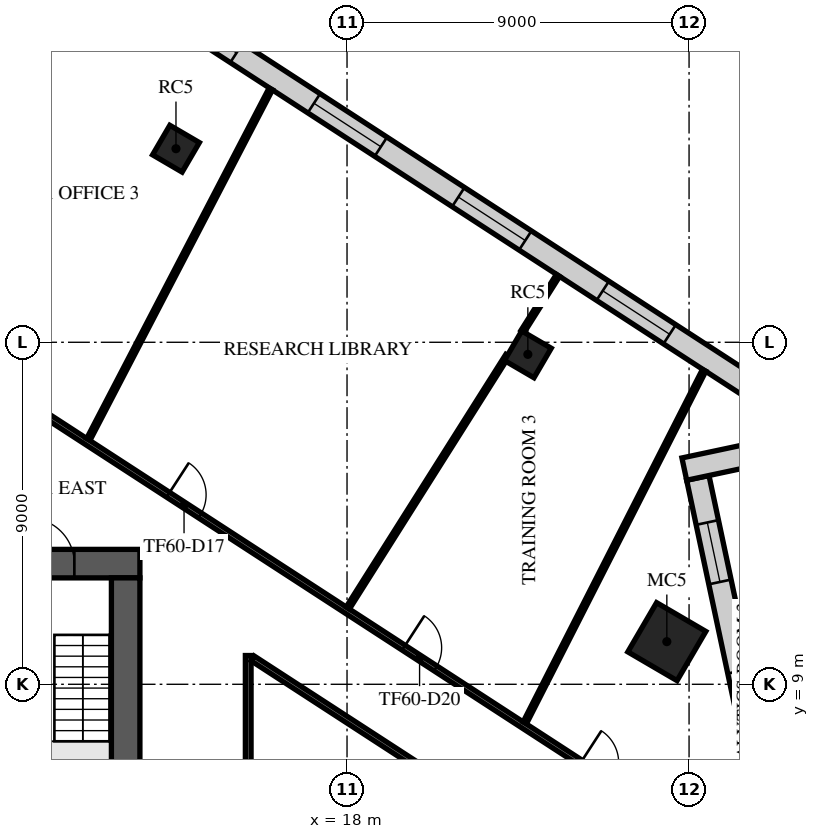
"""IFC4 building model, lengths in metres.
Left out: names, types, materials, properties, quantities, classifications, styles, units other than length and angle.
Written with IfcOpenShell. Run it as: python <this file> out.ifc"""

import sys

from ifc_helpers import new_model, si_unit, direction, frame, frame_2d, origin, origin_2d, place, context, subcontext, project, spatial, rectangle, extrude, element, fill, save


model = new_model("IFC4")
c1 = context("Model", 3, precision=1e-05, world=origin(), true_north=direction((0.0, 1.0)))
c2 = subcontext(c1, "Body", "Model", "MODEL_VIEW")
j1 = project(units=[si_unit("LENGTHUNIT", "METRE"), si_unit("PLANEANGLEUNIT", "RADIAN")], contexts=[c1])
p1 = place(None, origin())
s1 = spatial("IfcSite", under=j1, at=p1, CompositionType="ELEMENT")
p2 = place(p1, origin())
s2 = spatial("IfcBuilding", under=s1, at=p2, CompositionType="ELEMENT")
p3 = place(p2, frame((0.0, 0.0, 254.9)))
s3 = spatial("IfcBuildingStorey", under=s2, at=p3, CompositionType="ELEMENT", Elevation=254.9)
p4 = place(p3, frame((26.415, 10.122, 0.0), z_axis=(0.0, 0.0, 1.0), x_axis=(0.504643651291, 0.863327739165, 0.0)))
e1 = element("IfcColumn", 1, at=p4, inside=s3, PredefinedType="COLUMN", context=c2, shape_type="SweptSolid", body=[
    extrude(rectangle(XDim=1.5, YDim=1.5, at=origin_2d()), origin(), (0.0, 0.0, 1.0), 4.0),
])
for number, where, z_axis, x_axis in (
    (2, (22.758, 17.682, 0.0), (0.0, 0.0, 1.0), (0.505, 0.863, 0.0)),
    (3, (13.499, 23.094, 0.0), (0.0, 0.0, 1.0), (0.505, 0.863, 0.0)),
):
    element("IfcColumn", number, at=place(p3, frame(where, z_axis=z_axis, x_axis=x_axis)), inside=s3, PredefinedType="COLUMN", context=c2, shape_type="SweptSolid", body=[
        extrude(rectangle(XDim=0.9, YDim=0.9, at=origin_2d()), origin(), (0.0, 0.0, 1.0), 4.0),
    ])
p5 = place(p3, frame((-12.55, 12.175, 0.0), z_axis=(0.0, 0.0, 1.0), x_axis=(1.0, 0.0, 0.0)))
e4 = element("IfcWall", 4, at=p5, inside=s3, PredefinedType="SHEAR", context=c2, shape_type="SweptSolid", body=[
    extrude(rectangle(XDim=25.1, YDim=0.75, at=frame_2d((12.55, 0.0))), origin(), (0.0, 0.0, 1.0), 3.64),
])
p6 = place(p5, frame((11.35, 0.0, 0.0)))
e5 = element("IfcOpeningElement", 5, at=p6, cuts=e4, PredefinedType="OPENING", context=c2, shape_type="SweptSolid", body=[
    extrude(rectangle(XDim=2.4, YDim=2.4, at=frame_2d((1.2, 1.2))), frame((0.0, 0.385, 0.0), z_axis=(0.0, -1.0, 0.0), x_axis=(1.0, 0.0, 0.0)), (0.0, 0.0, 1.0), 0.77),
])
p7 = place(p5, frame((22.175, 0.0, 0.0)))
e6 = element("IfcOpeningElement", 6, at=p7, cuts=e4, PredefinedType="OPENING", context=c2, shape_type="SweptSolid", body=[
    extrude(rectangle(XDim=1.2, YDim=2.1, at=frame_2d((0.6, 1.05))), frame((0.0, 0.385, 0.0), z_axis=(0.0, -1.0, 0.0), x_axis=(1.0, 0.0, 0.0)), (0.0, 0.0, 1.0), 0.77),
])
p8 = place(p5, frame((1.15, 0.0, 0.0)))
e7 = element("IfcOpeningElement", 7, at=p8, cuts=e4, PredefinedType="OPENING", context=c2, shape_type="SweptSolid", body=[
    extrude(rectangle(XDim=1.0, YDim=2.1, at=frame_2d((0.5, 1.05))), frame((0.0, 0.385, 0.0), z_axis=(0.0, -1.0, 0.0), x_axis=(1.0, 0.0, 0.0)), (0.0, 0.0, 1.0), 0.77),
])
p9 = place(p3, frame((12.175, -11.8, 0.0), z_axis=(0.0, 0.0, 1.0), x_axis=(0.0, 1.0, 0.0)))
e8 = element("IfcWall", 8, at=p9, inside=s3, PredefinedType="SHEAR", context=c2, shape_type="SweptSolid", body=[
    extrude(rectangle(XDim=23.6, YDim=0.75, at=frame_2d((11.8, 0.0))), origin(), (0.0, 0.0, 1.0), 3.64),
])
p10 = place(p9, frame((10.6, 0.0, 0.0)))
e9 = element("IfcOpeningElement", 9, at=p10, cuts=e8, PredefinedType="OPENING", context=c2, shape_type="SweptSolid", body=[
    extrude(rectangle(XDim=2.4, YDim=2.4, at=frame_2d((1.2, 1.2))), frame((0.0, 0.385, 0.0), z_axis=(0.0, -1.0, 0.0), x_axis=(1.0, 0.0, 0.0)), (0.0, 0.0, 1.0), 0.77),
])
p11 = place(p3, frame((6.367, -33.16, 0.0), z_axis=(0.0, 0.0, 1.0), x_axis=(0.544637371147, 0.838671648472, 0.0)))
e10 = element("IfcWall", 10, at=p11, inside=s3, PredefinedType="STANDARD", context=c2, shape_type="SweptSolid", body=[
    extrude(rectangle(XDim=48.686, YDim=0.6, at=frame_2d((24.343, 0.0))), origin(), (0.0, 0.0, 1.0), 3.64),
])
p12 = place(p11, frame((1.213, 0.0, 0.9)))
e11 = element("IfcOpeningElement", 11, at=p12, cuts=e10, PredefinedType="OPENING", context=c2, shape_type="SweptSolid", body=[
    extrude(rectangle(XDim=2.0, YDim=2.1, at=frame_2d((1.0, 1.05))), frame((0.0, 0.31, 0.0), z_axis=(0.0, -1.0, 0.0), x_axis=(1.0, 0.0, 0.0)), (0.0, 0.0, 1.0), 0.62),
])
p13 = place(p11, frame((5.639, 0.0, 0.9)))
e12 = element("IfcOpeningElement", 12, at=p13, cuts=e10, PredefinedType="OPENING", context=c2, shape_type="SweptSolid", body=[
    extrude(rectangle(XDim=2.0, YDim=2.1, at=frame_2d((1.0, 1.05))), frame((0.0, 0.31, 0.0), z_axis=(0.0, -1.0, 0.0), x_axis=(1.0, 0.0, 0.0)), (0.0, 0.0, 1.0), 0.62),
])
p14 = place(p11, frame((14.491, 0.0, 0.9)))
e13 = element("IfcOpeningElement", 13, at=p14, cuts=e10, PredefinedType="OPENING", context=c2, shape_type="SweptSolid", body=[
    extrude(rectangle(XDim=2.0, YDim=2.1, at=frame_2d((1.0, 1.05))), frame((0.0, 0.31, 0.0), z_axis=(0.0, -1.0, 0.0), x_axis=(1.0, 0.0, 0.0)), (0.0, 0.0, 1.0), 0.62),
])
p15 = place(p11, frame((18.917, 0.0, 0.9)))
e14 = element("IfcOpeningElement", 14, at=p15, cuts=e10, PredefinedType="OPENING", context=c2, shape_type="SweptSolid", body=[
    extrude(rectangle(XDim=2.0, YDim=2.1, at=frame_2d((1.0, 1.05))), frame((0.0, 0.31, 0.0), z_axis=(0.0, -1.0, 0.0), x_axis=(1.0, 0.0, 0.0)), (0.0, 0.0, 1.0), 0.62),
])
p16 = place(p11, frame((23.343, 0.0, 0.9)))
e15 = element("IfcOpeningElement", 15, at=p16, cuts=e10, PredefinedType="OPENING", context=c2, shape_type="SweptSolid", body=[
    extrude(rectangle(XDim=2.0, YDim=2.1, at=frame_2d((1.0, 1.05))), frame((0.0, 0.31, 0.0), z_axis=(0.0, -1.0, 0.0), x_axis=(1.0, 0.0, 0.0)), (0.0, 0.0, 1.0), 0.62),
])
p17 = place(p11, frame((27.769, 0.0, 0.9)))
e16 = element("IfcOpeningElement", 16, at=p17, cuts=e10, PredefinedType="OPENING", context=c2, shape_type="SweptSolid", body=[
    extrude(rectangle(XDim=2.0, YDim=2.1, at=frame_2d((1.0, 1.05))), frame((0.0, 0.31, 0.0), z_axis=(0.0, -1.0, 0.0), x_axis=(1.0, 0.0, 0.0)), (0.0, 0.0, 1.0), 0.62),
])
p18 = place(p11, frame((32.195, 0.0, 0.9)))
e17 = element("IfcOpeningElement", 17, at=p18, cuts=e10, PredefinedType="OPENING", context=c2, shape_type="SweptSolid", body=[
    extrude(rectangle(XDim=2.0, YDim=2.1, at=frame_2d((1.0, 1.05))), frame((0.0, 0.31, 0.0), z_axis=(0.0, -1.0, 0.0), x_axis=(1.0, 0.0, 0.0)), (0.0, 0.0, 1.0), 0.62),
])
p19 = place(p11, frame((36.621, 0.0, 0.9)))
e18 = element("IfcOpeningElement", 18, at=p19, cuts=e10, PredefinedType="OPENING", context=c2, shape_type="SweptSolid", body=[
    extrude(rectangle(XDim=2.0, YDim=2.1, at=frame_2d((1.0, 1.05))), frame((0.0, 0.31, 0.0), z_axis=(0.0, -1.0, 0.0), x_axis=(1.0, 0.0, 0.0)), (0.0, 0.0, 1.0), 0.62),
])
p20 = place(p11, frame((41.047, 0.0, 0.9)))
e19 = element("IfcOpeningElement", 19, at=p20, cuts=e10, PredefinedType="OPENING", context=c2, shape_type="SweptSolid", body=[
    extrude(rectangle(XDim=2.0, YDim=2.1, at=frame_2d((1.0, 1.05))), frame((0.0, 0.31, 0.0), z_axis=(0.0, -1.0, 0.0), x_axis=(1.0, 0.0, 0.0)), (0.0, 0.0, 1.0), 0.62),
])
p21 = place(p11, frame((45.473, 0.0, 0.9)))
e20 = element("IfcOpeningElement", 20, at=p21, cuts=e10, PredefinedType="OPENING", context=c2, shape_type="SweptSolid", body=[
    extrude(rectangle(XDim=2.0, YDim=2.1, at=frame_2d((1.0, 1.05))), frame((0.0, 0.31, 0.0), z_axis=(0.0, -1.0, 0.0), x_axis=(1.0, 0.0, 0.0)), (0.0, 0.0, 1.0), 0.62),
])
p22 = place(p3, frame((28.894, 6.606, 0.0), z_axis=(0.0, 0.0, 1.0), x_axis=(-0.207886494942, 0.978152955943, 0.0)))
e21 = element("IfcWall", 21, at=p22, inside=s3, PredefinedType="STANDARD", context=c2, shape_type="SweptSolid", body=[
    extrude(rectangle(XDim=8.0, YDim=0.6, at=frame_2d((4.0, 0.0))), origin(), (0.0, 0.0, 1.0), 3.64),
])
p23 = place(p22, frame((1.2, 0.0, 0.9)))
e22 = element("IfcOpeningElement", 22, at=p23, cuts=e21, PredefinedType="OPENING", context=c2, shape_type="SweptSolid", body=[
    extrude(rectangle(XDim=1.6, YDim=2.1, at=frame_2d((0.8, 1.05))), frame((0.0, 0.31, 0.0), z_axis=(0.0, -1.0, 0.0), x_axis=(1.0, 0.0, 0.0)), (0.0, 0.0, 1.0), 0.62),
])
p24 = place(p22, frame((5.2, 0.0, 0.9)))
e23 = element("IfcOpeningElement", 23, at=p24, cuts=e21, PredefinedType="OPENING", context=c2, shape_type="SweptSolid", body=[
    extrude(rectangle(XDim=1.6, YDim=2.1, at=frame_2d((0.8, 1.05))), frame((0.0, 0.31, 0.0), z_axis=(0.0, -1.0, 0.0), x_axis=(1.0, 0.0, 0.0)), (0.0, 0.0, 1.0), 0.62),
])
p25 = place(p3, frame((26.875, 14.663, 0.0), z_axis=(0.0, 0.0, 1.0), x_axis=(0.978145598061, 0.207921112429, 0.0)))
e24 = element("IfcWall", 24, at=p25, inside=s3, PredefinedType="STANDARD", context=c2, shape_type="SweptSolid", body=[
    extrude(rectangle(XDim=4.636, YDim=0.6, at=frame_2d((2.318, 0.0))), origin(), (0.0, 0.0, 1.0), 3.64),
])
p26 = place(p25, frame((1.818, 0.0, 0.9)))
e25 = element("IfcOpeningElement", 25, at=p26, cuts=e24, PredefinedType="OPENING", context=c2, shape_type="SweptSolid", body=[
    extrude(rectangle(XDim=1.6, YDim=2.1, at=frame_2d((0.8, 1.05))), frame((0.0, 0.31, 0.0), z_axis=(0.0, -1.0, 0.0), x_axis=(1.0, 0.0, 0.0)), (0.0, 0.0, 1.0), 0.62),
])
p27 = place(p3, frame((31.308, 15.082, 0.0), z_axis=(0.0, 0.0, 1.0), x_axis=(-0.838672242303, 0.544636456721, 0.0)))
e26 = element("IfcWall", 26, at=p27, inside=s3, PredefinedType="STANDARD", context=c2, shape_type="SweptSolid", body=[
    extrude(rectangle(XDim=36.243, YDim=0.6, at=frame_2d((18.122, 0.0))), origin(), (0.0, 0.0, 1.0), 3.64),
])
p28 = place(p27, frame((1.215, 0.0, 0.9)))
e27 = element("IfcOpeningElement", 27, at=p28, cuts=e26, PredefinedType="OPENING", context=c2, shape_type="SweptSolid", body=[
    extrude(rectangle(XDim=2.1, YDim=2.1, at=frame_2d((1.05, 1.05))), frame((0.0, 0.31, 0.0), z_axis=(0.0, -1.0, 0.0), x_axis=(1.0, 0.0, 0.0)), (0.0, 0.0, 1.0), 0.62),
])
p29 = place(p27, frame((5.746, 0.0, 0.9)))
e28 = element("IfcOpeningElement", 28, at=p29, cuts=e26, PredefinedType="OPENING", context=c2, shape_type="SweptSolid", body=[
    extrude(rectangle(XDim=2.1, YDim=2.1, at=frame_2d((1.05, 1.05))), frame((0.0, 0.31, 0.0), z_axis=(0.0, -1.0, 0.0), x_axis=(1.0, 0.0, 0.0)), (0.0, 0.0, 1.0), 0.62),
])
p30 = place(p27, frame((10.276, 0.0, 0.9)))
e29 = element("IfcOpeningElement", 29, at=p30, cuts=e26, PredefinedType="OPENING", context=c2, shape_type="SweptSolid", body=[
    extrude(rectangle(XDim=2.1, YDim=2.1, at=frame_2d((1.05, 1.05))), frame((0.0, 0.31, 0.0), z_axis=(0.0, -1.0, 0.0), x_axis=(1.0, 0.0, 0.0)), (0.0, 0.0, 1.0), 0.62),
])
p31 = place(p27, frame((14.806, 0.0, 0.9)))
e30 = element("IfcOpeningElement", 30, at=p31, cuts=e26, PredefinedType="OPENING", context=c2, shape_type="SweptSolid", body=[
    extrude(rectangle(XDim=2.1, YDim=2.1, at=frame_2d((1.05, 1.05))), frame((0.0, 0.31, 0.0), z_axis=(0.0, -1.0, 0.0), x_axis=(1.0, 0.0, 0.0)), (0.0, 0.0, 1.0), 0.62),
])
p32 = place(p27, frame((19.337, 0.0, 0.9)))
e31 = element("IfcOpeningElement", 31, at=p32, cuts=e26, PredefinedType="OPENING", context=c2, shape_type="SweptSolid", body=[
    extrude(rectangle(XDim=2.1, YDim=2.1, at=frame_2d((1.05, 1.05))), frame((0.0, 0.31, 0.0), z_axis=(0.0, -1.0, 0.0), x_axis=(1.0, 0.0, 0.0)), (0.0, 0.0, 1.0), 0.62),
])
p33 = place(p27, frame((23.867, 0.0, 0.9)))
e32 = element("IfcOpeningElement", 32, at=p33, cuts=e26, PredefinedType="OPENING", context=c2, shape_type="SweptSolid", body=[
    extrude(rectangle(XDim=2.1, YDim=2.1, at=frame_2d((1.05, 1.05))), frame((0.0, 0.31, 0.0), z_axis=(0.0, -1.0, 0.0), x_axis=(1.0, 0.0, 0.0)), (0.0, 0.0, 1.0), 0.62),
])
p34 = place(p27, frame((28.398, 0.0, 0.9)))
e33 = element("IfcOpeningElement", 33, at=p34, cuts=e26, PredefinedType="OPENING", context=c2, shape_type="SweptSolid", body=[
    extrude(rectangle(XDim=2.1, YDim=2.1, at=frame_2d((1.05, 1.05))), frame((0.0, 0.31, 0.0), z_axis=(0.0, -1.0, 0.0), x_axis=(1.0, 0.0, 0.0)), (0.0, 0.0, 1.0), 0.62),
])
p35 = place(p27, frame((32.928, 0.0, 0.9)))
e34 = element("IfcOpeningElement", 34, at=p35, cuts=e26, PredefinedType="OPENING", context=c2, shape_type="SweptSolid", body=[
    extrude(rectangle(XDim=2.1, YDim=2.1, at=frame_2d((1.05, 1.05))), frame((0.0, 0.31, 0.0), z_axis=(0.0, -1.0, 0.0), x_axis=(1.0, 0.0, 0.0)), (0.0, 0.0, 1.0), 0.62),
])
p36 = place(p3, frame((-6.127, 26.598, 0.0), z_axis=(0.0, 0.0, 1.0), x_axis=(0.838670911559, -0.544638505897, 0.0)))
e35 = element("IfcWall", 35, at=p36, inside=s3, PredefinedType="PARTITIONING", context=c2, shape_type="SweptSolid", body=[
    extrude(rectangle(XDim=39.325, YDim=0.15, at=frame_2d((19.663, 0.0))), origin(), (0.0, 0.0, 1.0), 3.04),
])
p37 = place(p36, frame((9.3, 0.0, 0.0)))
e36 = element("IfcOpeningElement", 36, at=p37, cuts=e35, PredefinedType="OPENING", context=c2, shape_type="SweptSolid", body=[
    extrude(rectangle(XDim=1.8, YDim=2.1, at=frame_2d((0.9, 1.05))), frame((0.0, 0.085, 0.0), z_axis=(0.0, -1.0, 0.0), x_axis=(1.0, 0.0, 0.0)), (0.0, 0.0, 1.0), 0.17),
])
p38 = place(p36, frame((12.185, 0.0, 0.0)))
e37 = element("IfcOpeningElement", 37, at=p38, cuts=e35, PredefinedType="OPENING", context=c2, shape_type="SweptSolid", body=[
    extrude(rectangle(XDim=1.0, YDim=2.1, at=frame_2d((0.5, 1.05))), frame((0.0, 0.085, 0.0), z_axis=(0.0, -1.0, 0.0), x_axis=(1.0, 0.0, 0.0)), (0.0, 0.0, 1.0), 0.17),
])
p39 = place(p36, frame((23.155, 0.0, 0.0)))
e38 = element("IfcOpeningElement", 38, at=p39, cuts=e35, PredefinedType="OPENING", context=c2, shape_type="SweptSolid", body=[
    extrude(rectangle(XDim=1.0, YDim=2.1, at=frame_2d((0.5, 1.05))), frame((0.0, 0.085, 0.0), z_axis=(0.0, -1.0, 0.0), x_axis=(1.0, 0.0, 0.0)), (0.0, 0.0, 1.0), 0.17),
])
p40 = place(p36, frame((30.544, 0.0, 0.0)))
e39 = element("IfcOpeningElement", 39, at=p40, cuts=e35, PredefinedType="OPENING", context=c2, shape_type="SweptSolid", body=[
    extrude(rectangle(XDim=1.0, YDim=2.1, at=frame_2d((0.5, 1.05))), frame((0.0, 0.085, 0.0), z_axis=(0.0, -1.0, 0.0), x_axis=(1.0, 0.0, 0.0)), (0.0, 0.0, 1.0), 0.17),
])
p41 = place(p36, frame((36.099, 0.0, 0.0)))
e40 = element("IfcOpeningElement", 40, at=p41, cuts=e35, PredefinedType="OPENING", context=c2, shape_type="SweptSolid", body=[
    extrude(rectangle(XDim=1.0, YDim=2.1, at=frame_2d((0.5, 1.05))), frame((0.0, 0.085, 0.0), z_axis=(0.0, -1.0, 0.0), x_axis=(1.0, 0.0, 0.0)), (0.0, 0.0, 1.0), 0.17),
])
p42 = place(p3, frame((15.4, -15.325, 0.0), z_axis=(0.0, 0.0, 1.0), x_axis=(0.0, 1.0, 0.0)))
e41 = element("IfcWall", 41, at=p42, inside=s3, PredefinedType="PARTITIONING", context=c2, shape_type="SweptSolid", body=[
    extrude(rectangle(XDim=25.082, YDim=0.15, at=frame_2d((12.541, 0.0))), origin(), (0.0, 0.0, 1.0), 3.24),
])
p43 = place(p42, frame((6.847, 0.0, 0.0)))
e42 = element("IfcOpeningElement", 42, at=p43, cuts=e41, PredefinedType="OPENING", context=c2, shape_type="SweptSolid", body=[
    extrude(rectangle(XDim=1.0, YDim=2.1, at=frame_2d((0.5, 1.05))), frame((0.0, 0.085, 0.0), z_axis=(0.0, -1.0, 0.0), x_axis=(1.0, 0.0, 0.0)), (0.0, 0.0, 1.0), 0.17),
])
p44 = place(p42, frame((13.512, 0.0, 0.0)))
e43 = element("IfcOpeningElement", 43, at=p44, cuts=e41, PredefinedType="OPENING", context=c2, shape_type="SweptSolid", body=[
    extrude(rectangle(XDim=1.0, YDim=2.1, at=frame_2d((0.5, 1.05))), frame((0.0, 0.085, 0.0), z_axis=(0.0, -1.0, 0.0), x_axis=(1.0, 0.0, 0.0)), (0.0, 0.0, 1.0), 0.17),
])
p45 = place(p3, frame((15.516, 9.682, 0.0), z_axis=(0.0, 0.0, 1.0), x_axis=(0.838687901934, -0.544612342083, 0.0)))
e44 = element("IfcWall", 44, at=p45, inside=s3, PredefinedType="PARTITIONING", context=c2, shape_type="SweptSolid", body=[
    extrude(rectangle(XDim=11.961, YDim=0.15, at=frame_2d((5.98, 0.0))), origin(), (0.0, 0.0, 1.0), 3.04),
])
p46 = place(p3, frame((11.194, 15.445, 0.0), z_axis=(0.0, 0.0, 1.0), x_axis=(0.461705411455, 0.887033321264, 0.0)))
e45 = element("IfcWall", 45, at=p46, inside=s3, PredefinedType="PARTITIONING", context=c2, shape_type="SweptSolid", body=[
    extrude(rectangle(XDim=10.396, YDim=0.1, at=frame_2d((5.198, 0.0))), origin(), (0.0, 0.0, 1.0), 3.04),
])
p47 = place(p3, frame((18.021, 11.007, 0.0), z_axis=(0.0, 0.0, 1.0), x_axis=(0.53413665333, 0.845398152097, 0.0)))
e46 = element("IfcWall", 46, at=p47, inside=s3, PredefinedType="PARTITIONING", context=c2, shape_type="SweptSolid", body=[
    extrude(rectangle(XDim=7.864, YDim=0.1, at=frame_2d((3.932, 0.0))), origin(), (0.0, 0.0, 1.0), 3.24),
])
p48 = place(p3, frame((22.619, 18.285, 0.0), z_axis=(0.0, 0.0, 1.0), x_axis=(0.53411937272, 0.845409070028, 0.0)))
e47 = element("IfcWall", 47, at=p48, inside=s3, PredefinedType="PARTITIONING", context=c2, shape_type="SweptSolid", body=[
    extrude(rectangle(XDim=1.744, YDim=0.1, at=frame_2d((0.872, 0.0))), origin(), (0.0, 0.0, 1.0), 3.64),
])
p49 = place(p3, frame((22.679, 7.987, 0.0), z_axis=(0.0, 0.0, 1.0), x_axis=(0.453387595121, 0.891313462588, 0.0)))
e48 = element("IfcWall", 48, at=p49, inside=s3, PredefinedType="PARTITIONING", context=c2, shape_type="SweptSolid", body=[
    extrude(rectangle(XDim=10.406, YDim=0.1, at=frame_2d((5.203, 0.0))), origin(), (0.0, 0.0, 1.0), 3.04),
])
p50 = place(p7, origin())
e49 = element("IfcDoor", 49, at=p50, inside=s3, OperationType="SINGLE_SWING_LEFT", PredefinedType="DOOR", context=c2, shape_type="SweptSolid", body=[
    extrude(rectangle(XDim=1.2, YDim=2.1, at=frame_2d((0.6, 1.05))), frame((0.0, 0.025, 0.0), z_axis=(0.0, -1.0, 0.0), x_axis=(1.0, 0.0, 0.0)), (0.0, 0.0, 1.0), 0.05),
])
fill(e6, e49)
p51 = place(p23, origin())
e50 = element("IfcWindow", 50, at=p51, inside=s3, PartitioningType="SINGLE_PANEL", PredefinedType="WINDOW", context=c2, shape_type="SweptSolid", body=[
    extrude(rectangle(XDim=1.6, YDim=2.1, at=frame_2d((0.8, 1.05))), frame((0.0, 0.03, 0.0), z_axis=(0.0, -1.0, 0.0), x_axis=(1.0, 0.0, 0.0)), (0.0, 0.0, 1.0), 0.06),
])
fill(e22, e50)
p52 = place(p24, origin())
e51 = element("IfcWindow", 51, at=p52, inside=s3, PartitioningType="SINGLE_PANEL", PredefinedType="WINDOW", context=c2, shape_type="SweptSolid", body=[
    extrude(rectangle(XDim=1.6, YDim=2.1, at=frame_2d((0.8, 1.05))), frame((0.0, 0.03, 0.0), z_axis=(0.0, -1.0, 0.0), x_axis=(1.0, 0.0, 0.0)), (0.0, 0.0, 1.0), 0.06),
])
fill(e23, e51)
p53 = place(p29, origin())
e52 = element("IfcWindow", 52, at=p53, inside=s3, PartitioningType="SINGLE_PANEL", PredefinedType="WINDOW", context=c2, shape_type="SweptSolid", body=[
    extrude(rectangle(XDim=2.1, YDim=2.1, at=frame_2d((1.05, 1.05))), frame((0.0, 0.03, 0.0), z_axis=(0.0, -1.0, 0.0), x_axis=(1.0, 0.0, 0.0)), (0.0, 0.0, 1.0), 0.06),
])
fill(e28, e52)
p54 = place(p30, origin())
e53 = element("IfcWindow", 53, at=p54, inside=s3, PartitioningType="SINGLE_PANEL", PredefinedType="WINDOW", context=c2, shape_type="SweptSolid", body=[
    extrude(rectangle(XDim=2.1, YDim=2.1, at=frame_2d((1.05, 1.05))), frame((0.0, 0.03, 0.0), z_axis=(0.0, -1.0, 0.0), x_axis=(1.0, 0.0, 0.0)), (0.0, 0.0, 1.0), 0.06),
])
fill(e29, e53)
p55 = place(p31, origin())
e54 = element("IfcWindow", 54, at=p55, inside=s3, PartitioningType="SINGLE_PANEL", PredefinedType="WINDOW", context=c2, shape_type="SweptSolid", body=[
    extrude(rectangle(XDim=2.1, YDim=2.1, at=frame_2d((1.05, 1.05))), frame((0.0, 0.03, 0.0), z_axis=(0.0, -1.0, 0.0), x_axis=(1.0, 0.0, 0.0)), (0.0, 0.0, 1.0), 0.06),
])
fill(e30, e54)
p56 = place(p32, origin())
e55 = element("IfcWindow", 55, at=p56, inside=s3, PartitioningType="SINGLE_PANEL", PredefinedType="WINDOW", context=c2, shape_type="SweptSolid", body=[
    extrude(rectangle(XDim=2.1, YDim=2.1, at=frame_2d((1.05, 1.05))), frame((0.0, 0.03, 0.0), z_axis=(0.0, -1.0, 0.0), x_axis=(1.0, 0.0, 0.0)), (0.0, 0.0, 1.0), 0.06),
])
fill(e31, e55)
p57 = place(p39, origin())
e56 = element("IfcDoor", 56, at=p57, inside=s3, OperationType="SINGLE_SWING_RIGHT", PredefinedType="DOOR", context=c2, shape_type="SweptSolid", body=[
    extrude(rectangle(XDim=1.0, YDim=2.1, at=frame_2d((0.5, 1.05))), frame((0.0, 0.025, 0.0), z_axis=(0.0, -1.0, 0.0), x_axis=(1.0, 0.0, 0.0)), (0.0, 0.0, 1.0), 0.05),
])
fill(e38, e56)
p58 = place(p40, origin())
e57 = element("IfcDoor", 57, at=p58, inside=s3, OperationType="SINGLE_SWING_RIGHT", PredefinedType="DOOR", context=c2, shape_type="SweptSolid", body=[
    extrude(rectangle(XDim=1.0, YDim=2.1, at=frame_2d((0.5, 1.05))), frame((0.0, 0.025, 0.0), z_axis=(0.0, -1.0, 0.0), x_axis=(1.0, 0.0, 0.0)), (0.0, 0.0, 1.0), 0.05),
])
fill(e39, e57)
save(model, sys.argv[1])
